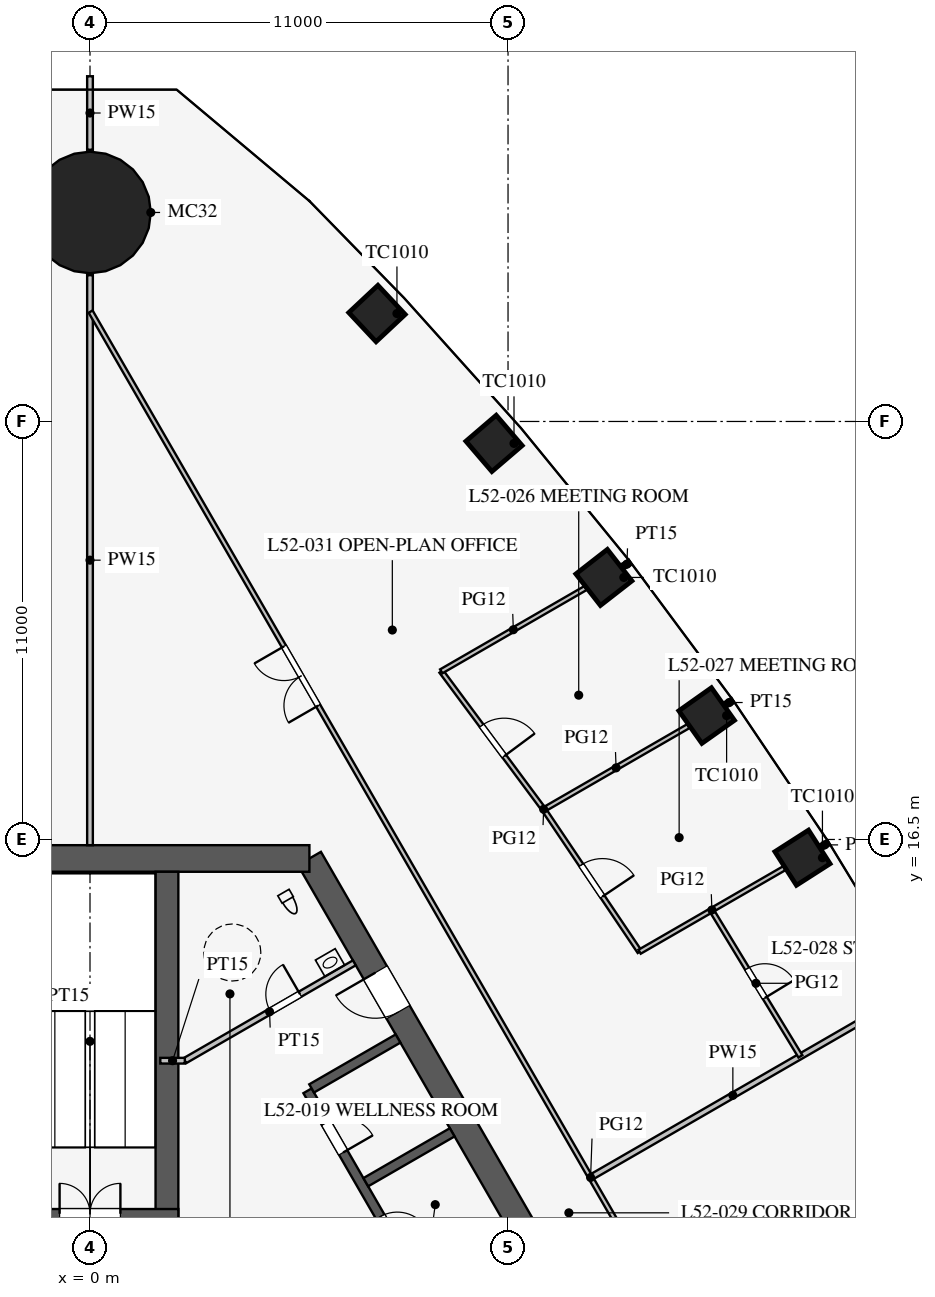
"""IFC4 building model, lengths in metres.
Left out: names, types, materials, properties, quantities, classifications, styles, units other than length and angle.
Written with IfcOpenShell. Run it as: python <this file> out.ifc"""

import sys

from ifc_helpers import new_model, si_unit, direction, frame, frame_2d, origin, origin_2d, place, context, subcontext, project, spatial, rectangle, circle, extrude, element, fill, save


model = new_model("IFC4")
c1 = context("Model", 3, precision=1e-05, world=origin(), true_north=direction((0.0, 1.0)))
c2 = subcontext(c1, "Body", "Model", "MODEL_VIEW")
j1 = project(units=[si_unit("LENGTHUNIT", "METRE"), si_unit("PLANEANGLEUNIT", "RADIAN")], contexts=[c1])
p1 = place(None, origin())
s1 = spatial("IfcSite", under=j1, at=p1, CompositionType="ELEMENT")
p2 = place(p1, origin())
s2 = spatial("IfcBuilding", under=s1, at=p2, CompositionType="ELEMENT")
p3 = place(p2, frame((0.0, 0.0, 227.5)))
s3 = spatial("IfcBuildingStorey", under=s2, at=p3, CompositionType="ELEMENT", Elevation=227.5)
for number, where, z_axis, x_axis in (
    (1, (18.748, 16.02, 0.0), (0.0, 0.0, 1.0), (-0.539, 0.842, 0.0)),
    (2, (16.227, 19.761, 0.0), (0.0, 0.0, 1.0), (-0.577, 0.816, 0.0)),
    (3, (13.522, 23.396, 0.0), (0.0, 0.0, 1.0), (-0.615, 0.789, 0.0)),
    (4, (10.632, 26.923, 0.0), (0.0, 0.0, 1.0), (-0.651, 0.759, 0.0)),
    (5, (7.552, 30.341, 0.0), (0.0, 0.0, 1.0), (-0.684, 0.73, 0.0)),
):
    element("IfcColumn", number, at=place(p3, frame(where, z_axis=z_axis, x_axis=x_axis)), inside=s3, PredefinedType="COLUMN", context=c2, shape_type="SweptSolid", body=[
        extrude(rectangle(XDim=1.05, YDim=1.05, at=origin_2d()), origin(), (0.0, 0.0, 1.0), 4.2),
    ])
p4 = place(p3, frame((0.0, 33.0, 0.0), z_axis=(0.0, 0.0, 1.0), x_axis=(1.0, 0.0, 0.0)))
e6 = element("IfcColumn", 6, at=p4, inside=s3, PredefinedType="COLUMN", context=c2, shape_type="SweptSolid", body=[
    extrude(circle(Radius=1.6, at=origin_2d()), origin(), (0.0, 0.0, 1.0), 4.2),
])
p5 = place(p3, frame((16.743, -3.0, 0.0), z_axis=(0.0, 0.0, 1.0), x_axis=(-0.500002442456, 0.866023993627, 0.0)))
e7 = element("IfcWall", 7, at=p5, inside=s3, PredefinedType="SHEAR", context=c2, shape_type="SweptSolid", body=[
    extrude(rectangle(XDim=21.939, YDim=0.7, at=frame_2d((10.97, 0.0))), origin(), (0.0, 0.0, 1.0), 4.2),
])
p6 = place(p5, frame((17.27, 0.0, 0.0)))
e8 = element("IfcOpeningElement", 8, at=p6, cuts=e7, PredefinedType="OPENING", context=c2, shape_type="SweptSolid", body=[
    extrude(rectangle(XDim=1.2, YDim=2.1, at=frame_2d((0.6, 1.05))), frame((0.0, 0.36, 0.0), z_axis=(0.0, -1.0, 0.0), x_axis=(1.0, 0.0, 0.0)), (0.0, 0.0, 1.0), 0.72),
])
p7 = place(p5, frame((3.47, 0.0, 0.0)))
e9 = element("IfcOpeningElement", 9, at=p7, cuts=e7, PredefinedType="OPENING", context=c2, shape_type="SweptSolid", body=[
    extrude(rectangle(XDim=1.2, YDim=2.1, at=frame_2d((0.6, 1.05))), frame((0.0, 0.36, 0.0), z_axis=(0.0, -1.0, 0.0), x_axis=(1.0, 0.0, 0.0)), (0.0, 0.0, 1.0), 0.72),
])
p8 = place(p3, frame((5.773, 16.0, 0.0), z_axis=(0.0, 0.0, 1.0), x_axis=(-1.0, 0.0, 0.0)))
e10 = element("IfcWall", 10, at=p8, inside=s3, PredefinedType="SHEAR", context=c2, shape_type="SweptSolid", body=[
    extrude(rectangle(XDim=11.547, YDim=0.7, at=frame_2d((5.773, 0.0))), origin(), (0.0, 0.0, 1.0), 4.2),
])
p9 = place(p3, frame((11.424, 0.014, 0.0), z_axis=(0.0, 0.0, 1.0), x_axis=(-0.500001763848, 0.866024385424, 0.0)))
e11 = element("IfcWall", 11, at=p9, inside=s3, PredefinedType="SHEAR", context=c2, shape_type="SweptSolid", body=[
    extrude(rectangle(XDim=11.4, YDim=0.25, at=frame_2d((5.7, 0.0))), origin(), (0.0, 0.0, 1.0), 4.2),
])
p10 = place(p9, frame((0.975, 0.0, 0.0)))
e12 = element("IfcOpeningElement", 12, at=p10, cuts=e11, PredefinedType="OPENING", context=c2, shape_type="SweptSolid", body=[
    extrude(rectangle(XDim=0.9, YDim=2.1, at=frame_2d((0.45, 1.05))), frame((0.0, 0.135, 0.0), z_axis=(0.0, -1.0, 0.0), x_axis=(1.0, 0.0, 0.0)), (0.0, 0.0, 1.0), 0.27),
])
p11 = place(p9, frame((3.825, 0.0, 0.0)))
e13 = element("IfcOpeningElement", 13, at=p11, cuts=e11, PredefinedType="OPENING", context=c2, shape_type="SweptSolid", body=[
    extrude(rectangle(XDim=0.9, YDim=2.1, at=frame_2d((0.45, 1.05))), frame((0.0, 0.135, 0.0), z_axis=(0.0, -1.0, 0.0), x_axis=(1.0, 0.0, 0.0)), (0.0, 0.0, 1.0), 0.27),
])
p12 = place(p9, frame((6.675, 0.0, 0.0)))
e14 = element("IfcOpeningElement", 14, at=p12, cuts=e11, PredefinedType="OPENING", context=c2, shape_type="SweptSolid", body=[
    extrude(rectangle(XDim=0.9, YDim=2.1, at=frame_2d((0.45, 1.05))), frame((0.0, 0.135, 0.0), z_axis=(0.0, -1.0, 0.0), x_axis=(1.0, 0.0, 0.0)), (0.0, 0.0, 1.0), 0.27),
])
p13 = place(p9, frame((9.525, 0.0, 0.0)))
e15 = element("IfcOpeningElement", 15, at=p13, cuts=e11, PredefinedType="OPENING", context=c2, shape_type="SweptSolid", body=[
    extrude(rectangle(XDim=0.9, YDim=2.1, at=frame_2d((0.45, 1.05))), frame((0.0, 0.135, 0.0), z_axis=(0.0, -1.0, 0.0), x_axis=(1.0, 0.0, 0.0)), (0.0, 0.0, 1.0), 0.27),
])
for number, where, z_axis, x_axis in (
    (16, (7.257, 7.481, 0.0), (0.0, 0.0, 1.0), (0.866, 0.5, 0.0)),
    (17, (5.832, 9.949, 0.0), (0.0, 0.0, 1.0), (0.866, 0.5, 0.0)),
):
    element("IfcWall", number, at=place(p3, frame(where, z_axis=z_axis, x_axis=x_axis)), inside=s3, PredefinedType="SHEAR", context=c2, shape_type="SweptSolid", body=[
        extrude(rectangle(XDim=2.625, YDim=0.25, at=frame_2d((1.312, 0.0))), origin(), (0.0, 0.0, 1.0), 4.2),
    ])
p14 = place(p3, frame((2.025, 6.525, 0.0), z_axis=(0.0, 0.0, 1.0), x_axis=(0.0, 1.0, 0.0)))
e18 = element("IfcWall", 18, at=p14, inside=s3, PredefinedType="SHEAR", context=c2, shape_type="SweptSolid", body=[
    extrude(rectangle(XDim=9.125, YDim=0.6, at=frame_2d((4.562, 0.0))), origin(), (0.0, 0.0, 1.0), 4.2),
])
p15 = place(p3, frame((2.325, 6.65, 0.0), z_axis=(0.0, 0.0, 1.0), x_axis=(-1.0, 0.0, 0.0)))
e19 = element("IfcWall", 19, at=p15, inside=s3, PredefinedType="SHEAR", context=c2, shape_type="SweptSolid", body=[
    extrude(rectangle(XDim=4.65, YDim=0.25, at=frame_2d((2.325, 0.0))), origin(), (0.0, 0.0, 1.0), 4.2),
])
p16 = place(p15, frame((1.525, 0.0, 0.0)))
e20 = element("IfcOpeningElement", 20, at=p16, cuts=e19, PredefinedType="OPENING", context=c2, shape_type="SweptSolid", body=[
    extrude(rectangle(XDim=1.6, YDim=2.1, at=frame_2d((0.8, 1.05))), frame((0.0, 0.135, 0.0), z_axis=(0.0, -1.0, 0.0), x_axis=(1.0, 0.0, 0.0)), (0.0, 0.0, 1.0), 0.27),
])
p17 = place(p3, frame((2.495, 10.678, 0.0), z_axis=(0.0, 0.0, 1.0), x_axis=(0.866037967349, 0.499978238636, 0.0)))
e21 = element("IfcWall", 21, at=p17, inside=s3, PredefinedType="PARTITIONING", context=c2, shape_type="SweptSolid", body=[
    extrude(rectangle(XDim=5.15, YDim=0.15, at=frame_2d((2.575, 0.0))), origin(), (0.0, 0.0, 1.0), 4.0),
])
p18 = place(p17, frame((2.6, 0.0, 0.0)))
e22 = element("IfcOpeningElement", 22, at=p18, cuts=e21, PredefinedType="OPENING", context=c2, shape_type="SweptSolid", body=[
    extrude(rectangle(XDim=0.9, YDim=2.1, at=frame_2d((0.45, 1.05))), frame((0.0, 0.085, 0.0), z_axis=(0.0, -1.0, 0.0), x_axis=(1.0, 0.0, 0.0)), (0.0, 0.0, 1.0), 0.17),
])
p19 = place(p3, frame((2.495, 10.678, 0.0), z_axis=(0.0, 0.0, 1.0), x_axis=(-1.0, 0.0, 0.0)))
e23 = element("IfcWall", 23, at=p19, inside=s3, PredefinedType="PARTITIONING", context=c2, shape_type="SweptSolid", body=[
    extrude(rectangle(XDim=0.645, YDim=0.15, at=frame_2d((0.323, 0.0))), origin(), (0.0, 0.0, 1.0), 4.0),
])
p20 = place(p3, frame((0.0, 16.35, 0.0), z_axis=(0.0, 0.0, 1.0), x_axis=(0.0, 1.0, 0.0)))
e24 = element("IfcWall", 24, at=p20, inside=s3, PredefinedType="PARTITIONING", context=c2, shape_type="SweptSolid", body=[
    extrude(rectangle(XDim=15.0, YDim=0.15, at=frame_2d((7.5, 0.0))), origin(), (0.0, 0.0, 1.0), 2.4),
])
p21 = place(p3, frame((0.0, 34.65, 0.0), z_axis=(0.0, 0.0, 1.0), x_axis=(0.0, 1.0, 0.0)))
e25 = element("IfcWall", 25, at=p21, inside=s3, PredefinedType="PARTITIONING", context=c2, shape_type="SweptSolid", body=[
    extrude(rectangle(XDim=1.935, YDim=0.15, at=frame_2d((0.967, 0.0))), origin(), (0.0, 0.0, 1.0), 2.4),
])
p22 = place(p3, frame((13.224, 7.635, 0.0), z_axis=(0.0, 0.0, 1.0), x_axis=(0.866035375346, 0.499982728352, 0.0)))
e26 = element("IfcWall", 26, at=p22, inside=s3, PredefinedType="PARTITIONING", context=c2, shape_type="SweptSolid", body=[
    extrude(rectangle(XDim=8.526, YDim=0.15, at=frame_2d((4.263, 0.0))), origin(), (0.0, 0.0, 1.0), 3.3),
])
p23 = place(p3, frame((26.328, -15.182, 0.0), z_axis=(0.0, 0.0, 1.0), x_axis=(-0.500000626146, 0.866025042278, 0.0)))
e27 = element("IfcWall", 27, at=p23, inside=s3, PredefinedType="PARTITIONING", context=c2, shape_type="SweptSolid", body=[
    extrude(rectangle(XDim=52.624, YDim=0.12, at=frame_2d((26.312, 0.0))), origin(), (0.0, 0.0, 1.0), 2.9),
])
p24 = place(p23, frame((10.15, 0.0, 0.15)))
e28 = element("IfcOpeningElement", 28, at=p24, cuts=e27, PredefinedType="OPENING", context=c2, shape_type="SweptSolid", body=[
    extrude(rectangle(XDim=1.8, YDim=2.1, at=frame_2d((0.9, 1.05))), frame((0.0, 0.07, 0.0), z_axis=(0.0, -1.0, 0.0), x_axis=(1.0, 0.0, 0.0)), (0.0, 0.0, 1.0), 0.14),
])
p25 = place(p23, frame((40.65, 0.0, 0.15)))
e29 = element("IfcOpeningElement", 29, at=p25, cuts=e27, PredefinedType="OPENING", context=c2, shape_type="SweptSolid", body=[
    extrude(rectangle(XDim=1.8, YDim=2.1, at=frame_2d((0.9, 1.05))), frame((0.0, 0.07, 0.0), z_axis=(0.0, -1.0, 0.0), x_axis=(1.0, 0.0, 0.0)), (0.0, 0.0, 1.0), 0.14),
])
p26 = place(p3, frame((14.039, 23.694, 0.0), z_axis=(0.0, 0.0, 1.0), x_axis=(0.866047486323, 0.49996174997, 0.0)))
e30 = element("IfcWall", 30, at=p26, inside=s3, PredefinedType="PARTITIONING", context=c2, shape_type="SweptSolid", body=[
    extrude(rectangle(XDim=0.206, YDim=0.15, at=frame_2d((0.103, 0.0))), origin(), (0.0, 0.0, 1.0), 2.9),
])
p27 = place(p3, frame((19.227, 16.297, 0.0), z_axis=(0.0, 0.0, 1.0), x_axis=(0.866135455726, 0.499809335981, 0.0)))
e31 = element("IfcWall", 31, at=p27, inside=s3, PredefinedType="PARTITIONING", context=c2, shape_type="SweptSolid", body=[
    extrude(rectangle(XDim=0.243, YDim=0.15, at=frame_2d((0.122, 0.0))), origin(), (0.0, 0.0, 1.0), 2.9),
])
p28 = place(p3, frame((16.725, 20.048, 0.0), z_axis=(0.0, 0.0, 1.0), x_axis=(0.866149170119, 0.499785569122, 0.0)))
e32 = element("IfcWall", 32, at=p28, inside=s3, PredefinedType="PARTITIONING", context=c2, shape_type="SweptSolid", body=[
    extrude(rectangle(XDim=0.223, YDim=0.15, at=frame_2d((0.112, 0.0))), origin(), (0.0, 0.0, 1.0), 2.9),
])
p29 = place(p3, frame((18.694, 10.793, 0.0), z_axis=(0.0, 0.0, 1.0), x_axis=(-0.519726678229, 0.854332593278, 0.0)))
e33 = element("IfcWall", 33, at=p29, inside=s3, PredefinedType="PARTITIONING", context=c2, shape_type="SweptSolid", body=[
    extrude(rectangle(XDim=4.501, YDim=0.12, at=frame_2d((2.25, 0.0))), origin(), (0.0, 0.0, 1.0), 2.9),
])
p30 = place(p29, frame((1.8, 0.0, 0.15)))
e34 = element("IfcOpeningElement", 34, at=p30, cuts=e33, PredefinedType="OPENING", context=c2, shape_type="SweptSolid", body=[
    extrude(rectangle(XDim=0.9, YDim=2.1, at=frame_2d((0.45, 1.05))), frame((0.0, 0.07, 0.0), z_axis=(0.0, -1.0, 0.0), x_axis=(1.0, 0.0, 0.0)), (0.0, 0.0, 1.0), 0.14),
])
p31 = place(p3, frame((14.462, 13.546, 0.0), z_axis=(0.0, 0.0, 1.0), x_axis=(-0.55850386778, 0.829501916619, 0.0)))
e35 = element("IfcWall", 35, at=p31, inside=s3, PredefinedType="PARTITIONING", context=c2, shape_type="SweptSolid", body=[
    extrude(rectangle(XDim=4.511, YDim=0.12, at=frame_2d((2.255, 0.0))), origin(), (0.0, 0.0, 1.0), 2.9),
])
p32 = place(p31, frame((1.75, 0.0, 0.15)))
e36 = element("IfcOpeningElement", 36, at=p32, cuts=e35, PredefinedType="OPENING", context=c2, shape_type="SweptSolid", body=[
    extrude(rectangle(XDim=1.0, YDim=2.1, at=frame_2d((0.5, 1.05))), frame((0.0, 0.07, 0.0), z_axis=(0.0, -1.0, 0.0), x_axis=(1.0, 0.0, 0.0)), (0.0, 0.0, 1.0), 0.14),
])
p33 = place(p3, frame((11.943, 17.287, 0.0), z_axis=(0.0, 0.0, 1.0), x_axis=(-0.59613842716, 0.802881669777, 0.0)))
e37 = element("IfcWall", 37, at=p33, inside=s3, PredefinedType="PARTITIONING", context=c2, shape_type="SweptSolid", body=[
    extrude(rectangle(XDim=4.53, YDim=0.12, at=frame_2d((2.265, 0.0))), origin(), (0.0, 0.0, 1.0), 2.9),
])
p34 = place(p33, frame((1.75, 0.0, 0.15)))
e38 = element("IfcOpeningElement", 38, at=p34, cuts=e37, PredefinedType="OPENING", context=c2, shape_type="SweptSolid", body=[
    extrude(rectangle(XDim=1.0, YDim=2.1, at=frame_2d((0.5, 1.05))), frame((0.0, 0.07, 0.0), z_axis=(0.0, -1.0, 0.0), x_axis=(1.0, 0.0, 0.0)), (0.0, 0.0, 1.0), 0.14),
])
p35 = place(p3, frame((9.242, 20.924, 0.0), z_axis=(0.0, 0.0, 1.0), x_axis=(0.866009302188, 0.500027887747, 0.0)))
e39 = element("IfcWall", 39, at=p35, inside=s3, PredefinedType="PARTITIONING", context=c2, shape_type="SweptSolid", body=[
    extrude(rectangle(XDim=4.382, YDim=0.12, at=frame_2d((2.191, 0.0))), origin(), (0.0, 0.0, 1.0), 2.9),
])
p36 = place(p3, frame((14.462, 13.546, 0.0), z_axis=(0.0, 0.0, 1.0), x_axis=(0.866025498715, 0.499999835575, 0.0)))
e40 = element("IfcWall", 40, at=p36, inside=s3, PredefinedType="PARTITIONING", context=c2, shape_type="SweptSolid", body=[
    extrude(rectangle(XDim=4.394, YDim=0.12, at=frame_2d((2.197, 0.0))), origin(), (0.0, 0.0, 1.0), 2.9),
])
p37 = place(p3, frame((11.943, 17.287, 0.0), z_axis=(0.0, 0.0, 1.0), x_axis=(0.86600959659, 0.500027377864, 0.0)))
e41 = element("IfcWall", 41, at=p37, inside=s3, PredefinedType="PARTITIONING", context=c2, shape_type="SweptSolid", body=[
    extrude(rectangle(XDim=4.389, YDim=0.12, at=frame_2d((2.195, 0.0))), origin(), (0.0, 0.0, 1.0), 2.9),
])
p38 = place(p18, origin())
e42 = element("IfcDoor", 42, at=p38, inside=s3, OperationType="SINGLE_SWING_RIGHT", PredefinedType="DOOR", context=c2, shape_type="SweptSolid", body=[
    extrude(rectangle(XDim=0.9, YDim=2.1, at=frame_2d((0.45, 1.05))), frame((0.0, 0.025, 0.0), z_axis=(0.0, -1.0, 0.0), x_axis=(1.0, 0.0, 0.0)), (0.0, 0.0, 1.0), 0.05),
])
fill(e22, e42)
p39 = place(p16, frame((1.6, 0.0, 0.0), z_axis=(0.0, 0.0, 1.0), x_axis=(-1.0, 0.0, 0.0)))
e43 = element("IfcDoor", 43, at=p39, inside=s3, OperationType="DOUBLE_DOOR_SINGLE_SWING", PredefinedType="DOOR", context=c2, shape_type="SweptSolid", body=[
    extrude(rectangle(XDim=1.6, YDim=2.1, at=frame_2d((0.8, 1.05))), frame((0.0, 0.025, 0.0), z_axis=(0.0, -1.0, 0.0), x_axis=(1.0, 0.0, 0.0)), (0.0, 0.0, 1.0), 0.05),
])
fill(e20, e43)
p40 = place(p6, origin())
e44 = element("IfcDoor", 44, at=p40, inside=s3, OperationType="SINGLE_SWING_RIGHT", PredefinedType="DOOR", context=c2, shape_type="SweptSolid", body=[
    extrude(rectangle(XDim=1.2, YDim=2.1, at=frame_2d((0.6, 1.05))), frame((0.0, 0.025, 0.0), z_axis=(0.0, -1.0, 0.0), x_axis=(1.0, 0.0, 0.0)), (0.0, 0.0, 1.0), 0.05),
])
fill(e8, e44)
p41 = place(p12, frame((0.9, 0.0, 0.0), z_axis=(0.0, 0.0, 1.0), x_axis=(-1.0, 0.0, 0.0)))
e45 = element("IfcDoor", 45, at=p41, inside=s3, OperationType="SINGLE_SWING_RIGHT", PredefinedType="DOOR", context=c2, shape_type="SweptSolid", body=[
    extrude(rectangle(XDim=0.9, YDim=2.1, at=frame_2d((0.45, 1.05))), frame((0.0, 0.025, 0.0), z_axis=(0.0, -1.0, 0.0), x_axis=(1.0, 0.0, 0.0)), (0.0, 0.0, 1.0), 0.05),
])
fill(e14, e45)
p42 = place(p13, frame((0.9, 0.0, 0.0), z_axis=(0.0, 0.0, 1.0), x_axis=(-1.0, 0.0, 0.0)))
e46 = element("IfcDoor", 46, at=p42, inside=s3, OperationType="SINGLE_SWING_RIGHT", PredefinedType="DOOR", context=c2, shape_type="SweptSolid", body=[
    extrude(rectangle(XDim=0.9, YDim=2.1, at=frame_2d((0.45, 1.05))), frame((0.0, 0.025, 0.0), z_axis=(0.0, -1.0, 0.0), x_axis=(1.0, 0.0, 0.0)), (0.0, 0.0, 1.0), 0.05),
])
fill(e15, e46)
p43 = place(p34, frame((1.0, 0.0, 0.0), z_axis=(0.0, 0.0, 1.0), x_axis=(-1.0, 0.0, 0.0)))
e47 = element("IfcDoor", 47, at=p43, inside=s3, OperationType="SINGLE_SWING_RIGHT", PredefinedType="DOOR", context=c2, shape_type="SweptSolid", body=[
    extrude(rectangle(XDim=1.0, YDim=2.1, at=frame_2d((0.5, 1.05))), frame((0.0, 0.025, 0.0), z_axis=(0.0, -1.0, 0.0), x_axis=(1.0, 0.0, 0.0)), (0.0, 0.0, 1.0), 0.05),
])
fill(e38, e47)
p44 = place(p32, frame((1.0, 0.0, 0.0), z_axis=(0.0, 0.0, 1.0), x_axis=(-1.0, 0.0, 0.0)))
e48 = element("IfcDoor", 48, at=p44, inside=s3, OperationType="SINGLE_SWING_RIGHT", PredefinedType="DOOR", context=c2, shape_type="SweptSolid", body=[
    extrude(rectangle(XDim=1.0, YDim=2.1, at=frame_2d((0.5, 1.05))), frame((0.0, 0.025, 0.0), z_axis=(0.0, -1.0, 0.0), x_axis=(1.0, 0.0, 0.0)), (0.0, 0.0, 1.0), 0.05),
])
fill(e36, e48)
p45 = place(p30, frame((0.9, 0.0, 0.0), z_axis=(0.0, 0.0, 1.0), x_axis=(-1.0, 0.0, 0.0)))
e49 = element("IfcDoor", 49, at=p45, inside=s3, OperationType="SINGLE_SWING_RIGHT", PredefinedType="DOOR", context=c2, shape_type="SweptSolid", body=[
    extrude(rectangle(XDim=0.9, YDim=2.1, at=frame_2d((0.45, 1.05))), frame((0.0, 0.025, 0.0), z_axis=(0.0, -1.0, 0.0), x_axis=(1.0, 0.0, 0.0)), (0.0, 0.0, 1.0), 0.05),
])
fill(e34, e49)
p46 = place(p25, origin())
e50 = element("IfcDoor", 50, at=p46, inside=s3, OperationType="DOUBLE_DOOR_SINGLE_SWING", PredefinedType="DOOR", context=c2, shape_type="SweptSolid", body=[
    extrude(rectangle(XDim=1.8, YDim=2.1, at=frame_2d((0.9, 1.05))), frame((0.0, 0.025, 0.0), z_axis=(0.0, -1.0, 0.0), x_axis=(1.0, 0.0, 0.0)), (0.0, 0.0, 1.0), 0.05),
])
fill(e29, e50)
save(model, sys.argv[1])
